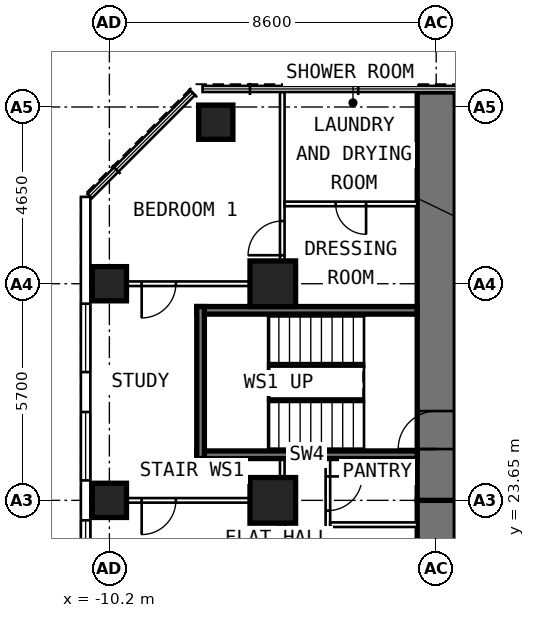
"""IFC4 building model, lengths in metres.
Left out: names, types, materials, properties, quantities, classifications, styles, units other than length and angle.
Written with IfcOpenShell. Run it as: python <this file> out.ifc"""

import sys

from ifc_helpers import new_model, si_unit, direction, frame, frame_2d, origin, origin_2d, place, context, subcontext, project, spatial, rectangle, extrude, element, fill, save


model = new_model("IFC4")
c1 = context("Model", 3, precision=1e-05, world=origin(), true_north=direction((0.0, 1.0)))
c2 = subcontext(c1, "Body", "Model", "MODEL_VIEW")
j1 = project(units=[si_unit("LENGTHUNIT", "METRE"), si_unit("PLANEANGLEUNIT", "RADIAN")], contexts=[c1])
p1 = place(None, origin())
s1 = spatial("IfcSite", under=j1, at=p1, CompositionType="ELEMENT")
p2 = place(p1, origin())
s2 = spatial("IfcBuilding", under=s1, at=p2, CompositionType="ELEMENT")
p3 = place(p2, frame((0.0, 0.0, 88.0)))
s3 = spatial("IfcBuildingStorey", under=s2, at=p3, CompositionType="ELEMENT", Elevation=88.0)
for number, where, z_axis, x_axis in (
    (1, (-10.2, 23.65, 0.0), (0.0, 0.0, 1.0), (0.0, 1.0, 0.0)),
    (2, (-10.2, 29.35, 0.0), (0.0, 0.0, 1.0), (0.0, 1.0, 0.0)),
    (3, (-7.4, 33.6, 0.0), (0.0, 0.0, 1.0), (0.0, 1.0, 0.0)),
):
    element("IfcColumn", number, at=place(p3, frame(where, z_axis=z_axis, x_axis=x_axis)), inside=s3, PredefinedType="COLUMN", context=c2, shape_type="SweptSolid", body=[
        extrude(rectangle(XDim=0.9, YDim=0.9, at=origin_2d()), origin(), (0.0, 0.0, 1.0), 3.6),
    ])
for number, where, z_axis, x_axis in (
    (4, (-5.9, 23.65, 0.0), (0.0, 0.0, 1.0), (0.0, 1.0, 0.0)),
    (5, (-5.9, 29.35, 0.0), (0.0, 0.0, 1.0), (0.0, 1.0, 0.0)),
):
    element("IfcColumn", number, at=place(p3, frame(where, z_axis=z_axis, x_axis=x_axis)), inside=s3, PredefinedType="COLUMN", context=c2, shape_type="SweptSolid", body=[
        extrude(rectangle(XDim=1.2, YDim=1.2, at=origin_2d()), origin(), (0.0, 0.0, 1.0), 3.6),
    ])
p4 = place(p3, frame((-1.6, 17.95, 0.0), z_axis=(0.0, 0.0, 1.0), x_axis=(0.0, 1.0, 0.0)))
e6 = element("IfcWall", 6, at=p4, inside=s3, PredefinedType="SHEAR", context=c2, shape_type="SweptSolid", body=[
    extrude(rectangle(XDim=5.7, YDim=1.0, at=frame_2d((2.85, 0.0))), origin(), (0.0, 0.0, 1.0), 3.6),
])
p5 = place(p4, frame((0.9, 0.0, 0.0)))
e7 = element("IfcOpeningElement", 7, at=p5, cuts=e6, PredefinedType="OPENING", context=c2, shape_type="SweptSolid", body=[
    extrude(rectangle(XDim=1.0, YDim=2.1, at=frame_2d((0.5, 1.05))), frame((0.0, 0.512, 0.0), z_axis=(0.0, -1.0, 0.0), x_axis=(1.0, 0.0, 0.0)), (0.0, 0.0, 1.0), 1.024),
])
p6 = place(p3, frame((-1.6, 23.65, 0.0), z_axis=(0.0, 0.0, 1.0), x_axis=(0.0, 1.0, 0.0)))
e8 = element("IfcWall", 8, at=p6, inside=s3, PredefinedType="SHEAR", context=c2, shape_type="SweptSolid", body=[
    extrude(rectangle(XDim=10.745, YDim=1.0, at=frame_2d((5.373, 0.0))), origin(), (0.0, 0.0, 1.0), 3.6),
])
p7 = place(p6, frame((1.35, 0.0, 0.0)))
e9 = element("IfcOpeningElement", 9, at=p7, cuts=e8, PredefinedType="OPENING", context=c2, shape_type="SweptSolid", body=[
    extrude(rectangle(XDim=1.0, YDim=2.1, at=frame_2d((0.5, 1.05))), frame((0.0, 0.512, 0.0), z_axis=(0.0, -1.0, 0.0), x_axis=(1.0, 0.0, 0.0)), (0.0, 0.0, 1.0), 1.024),
])
p8 = place(p3, frame((-10.825, 6.148, 0.0), z_axis=(0.0, 0.0, 1.0), x_axis=(0.0, 1.0, 0.0)))
e10 = element("IfcWall", 10, at=p8, inside=s3, PredefinedType="SOLIDWALL", context=c2, shape_type="SweptSolid", body=[
    extrude(rectangle(XDim=25.487, YDim=0.25, at=frame_2d((12.744, 0.0))), origin(), (0.0, 0.0, 1.0), 3.35),
])
p9 = place(p8, frame((0.927, 0.0, 0.8)))
e11 = element("IfcOpeningElement", 11, at=p9, cuts=e10, PredefinedType="OPENING", context=c2, shape_type="SweptSolid", body=[
    extrude(rectangle(XDim=1.8, YDim=1.8, at=frame_2d((0.9, 0.9))), frame((0.0, 0.137, 0.0), z_axis=(0.0, -1.0, 0.0), x_axis=(1.0, 0.0, 0.0)), (0.0, 0.0, 1.0), 0.274),
])
p10 = place(p8, frame((3.777, 0.0, 0.8)))
e12 = element("IfcOpeningElement", 12, at=p10, cuts=e10, PredefinedType="OPENING", context=c2, shape_type="SweptSolid", body=[
    extrude(rectangle(XDim=1.8, YDim=1.8, at=frame_2d((0.9, 0.9))), frame((0.0, 0.137, 0.0), z_axis=(0.0, -1.0, 0.0), x_axis=(1.0, 0.0, 0.0)), (0.0, 0.0, 1.0), 0.274),
])
p11 = place(p8, frame((6.627, 0.0, 0.8)))
e13 = element("IfcOpeningElement", 13, at=p11, cuts=e10, PredefinedType="OPENING", context=c2, shape_type="SweptSolid", body=[
    extrude(rectangle(XDim=1.8, YDim=1.8, at=frame_2d((0.9, 0.9))), frame((0.0, 0.137, 0.0), z_axis=(0.0, -1.0, 0.0), x_axis=(1.0, 0.0, 0.0)), (0.0, 0.0, 1.0), 0.274),
])
p12 = place(p8, frame((9.477, 0.0, 0.8)))
e14 = element("IfcOpeningElement", 14, at=p12, cuts=e10, PredefinedType="OPENING", context=c2, shape_type="SweptSolid", body=[
    extrude(rectangle(XDim=1.8, YDim=1.8, at=frame_2d((0.9, 0.9))), frame((0.0, 0.137, 0.0), z_axis=(0.0, -1.0, 0.0), x_axis=(1.0, 0.0, 0.0)), (0.0, 0.0, 1.0), 0.274),
])
p13 = place(p8, frame((12.327, 0.0, 0.8)))
e15 = element("IfcOpeningElement", 15, at=p13, cuts=e10, PredefinedType="OPENING", context=c2, shape_type="SweptSolid", body=[
    extrude(rectangle(XDim=1.8, YDim=1.8, at=frame_2d((0.9, 0.9))), frame((0.0, 0.137, 0.0), z_axis=(0.0, -1.0, 0.0), x_axis=(1.0, 0.0, 0.0)), (0.0, 0.0, 1.0), 0.274),
])
p14 = place(p8, frame((15.177, 0.0, 0.8)))
e16 = element("IfcOpeningElement", 16, at=p14, cuts=e10, PredefinedType="OPENING", context=c2, shape_type="SweptSolid", body=[
    extrude(rectangle(XDim=1.8, YDim=1.8, at=frame_2d((0.9, 0.9))), frame((0.0, 0.137, 0.0), z_axis=(0.0, -1.0, 0.0), x_axis=(1.0, 0.0, 0.0)), (0.0, 0.0, 1.0), 0.274),
])
p15 = place(p8, frame((18.027, 0.0, 0.8)))
e17 = element("IfcOpeningElement", 17, at=p15, cuts=e10, PredefinedType="OPENING", context=c2, shape_type="SweptSolid", body=[
    extrude(rectangle(XDim=1.8, YDim=1.8, at=frame_2d((0.9, 0.9))), frame((0.0, 0.137, 0.0), z_axis=(0.0, -1.0, 0.0), x_axis=(1.0, 0.0, 0.0)), (0.0, 0.0, 1.0), 0.274),
])
p16 = place(p8, frame((20.877, 0.0, 0.8)))
e18 = element("IfcOpeningElement", 18, at=p16, cuts=e10, PredefinedType="OPENING", context=c2, shape_type="SweptSolid", body=[
    extrude(rectangle(XDim=1.8, YDim=1.8, at=frame_2d((0.9, 0.9))), frame((0.0, 0.137, 0.0), z_axis=(0.0, -1.0, 0.0), x_axis=(1.0, 0.0, 0.0)), (0.0, 0.0, 1.0), 0.274),
])
p17 = place(p3, frame((-4.45, 18.05, 0.0), z_axis=(0.0, 0.0, 1.0), x_axis=(0.0, 1.0, 0.0)))
e19 = element("IfcWall", 19, at=p17, inside=s3, PredefinedType="PARTITIONING", context=c2, shape_type="SweptSolid", body=[
    extrude(rectangle(XDim=6.7, YDim=0.12, at=frame_2d((3.35, 0.0))), origin(), (0.0, 0.0, 1.0), 3.35),
])
p18 = place(p17, frame((0.75, 0.0, 0.0)))
e20 = element("IfcOpeningElement", 20, at=p18, cuts=e19, PredefinedType="OPENING", context=c2, shape_type="SweptSolid", body=[
    extrude(rectangle(XDim=0.9, YDim=2.1, at=frame_2d((0.45, 1.05))), frame((0.0, 0.072, 0.0), z_axis=(0.0, -1.0, 0.0), x_axis=(1.0, 0.0, 0.0)), (0.0, 0.0, 1.0), 0.144),
])
p19 = place(p17, frame((3.33, 0.0, 0.0)))
e21 = element("IfcOpeningElement", 21, at=p19, cuts=e19, PredefinedType="OPENING", context=c2, shape_type="SweptSolid", body=[
    extrude(rectangle(XDim=0.8, YDim=2.1, at=frame_2d((0.4, 1.05))), frame((0.0, 0.072, 0.0), z_axis=(0.0, -1.0, 0.0), x_axis=(1.0, 0.0, 0.0)), (0.0, 0.0, 1.0), 0.144),
])
p20 = place(p17, frame((5.33, 0.0, 0.0)))
e22 = element("IfcOpeningElement", 22, at=p20, cuts=e19, PredefinedType="OPENING", context=c2, shape_type="SweptSolid", body=[
    extrude(rectangle(XDim=0.9, YDim=2.1, at=frame_2d((0.45, 1.05))), frame((0.0, 0.072, 0.0), z_axis=(0.0, -1.0, 0.0), x_axis=(1.0, 0.0, 0.0)), (0.0, 0.0, 1.0), 0.144),
])
p21 = place(p3, frame((-5.65, 18.05, 0.0), z_axis=(0.0, 0.0, 1.0), x_axis=(0.0, 1.0, 0.0)))
e23 = element("IfcWall", 23, at=p21, inside=s3, PredefinedType="PARTITIONING", context=c2, shape_type="SweptSolid", body=[
    extrude(rectangle(XDim=6.7, YDim=0.12, at=frame_2d((3.35, 0.0))), origin(), (0.0, 0.0, 1.0), 3.35),
])
p22 = place(p21, frame((2.3, 0.0, 0.0)))
e24 = element("IfcOpeningElement", 24, at=p22, cuts=e23, PredefinedType="OPENING", context=c2, shape_type="SweptSolid", body=[
    extrude(rectangle(XDim=0.9, YDim=2.1, at=frame_2d((0.45, 1.05))), frame((0.0, 0.072, 0.0), z_axis=(0.0, -1.0, 0.0), x_axis=(1.0, 0.0, 0.0)), (0.0, 0.0, 1.0), 0.144),
])
p23 = place(p3, frame((-2.1, 23.01, 0.0), z_axis=(0.0, 0.0, 1.0), x_axis=(-1.0, 0.0, 0.0)))
e25 = element("IfcWall", 25, at=p23, inside=s3, PredefinedType="PARTITIONING", context=c2, shape_type="SweptSolid", body=[
    extrude(rectangle(XDim=2.29, YDim=0.12, at=frame_2d((1.145, 0.0))), origin(), (0.0, 0.0, 1.0), 3.35),
])
p24 = place(p3, frame((-5.71, 23.65, 0.0), z_axis=(0.0, 0.0, 1.0), x_axis=(-1.0, 0.0, 0.0)))
e26 = element("IfcWall", 26, at=p24, inside=s3, PredefinedType="PARTITIONING", context=c2, shape_type="SweptSolid", body=[
    extrude(rectangle(XDim=4.99, YDim=0.12, at=frame_2d((2.495, 0.0))), origin(), (0.0, 0.0, 1.0), 2.45),
])
p25 = place(p24, frame((2.74, 0.0, 0.0)))
e27 = element("IfcOpeningElement", 27, at=p25, cuts=e26, PredefinedType="OPENING", context=c2, shape_type="SweptSolid", body=[
    extrude(rectangle(XDim=0.9, YDim=2.1, at=frame_2d((0.45, 1.05))), frame((0.0, 0.072, 0.0), z_axis=(0.0, -1.0, 0.0), x_axis=(1.0, 0.0, 0.0)), (0.0, 0.0, 1.0), 0.144),
])
p26 = place(p3, frame((-5.71, 29.35, 0.0), z_axis=(0.0, 0.0, 1.0), x_axis=(-1.0, 0.0, 0.0)))
e28 = element("IfcWall", 28, at=p26, inside=s3, PredefinedType="PARTITIONING", context=c2, shape_type="SweptSolid", body=[
    extrude(rectangle(XDim=4.99, YDim=0.12, at=frame_2d((2.495, 0.0))), origin(), (0.0, 0.0, 1.0), 2.45),
])
p27 = place(p26, frame((2.74, 0.0, 0.0)))
e29 = element("IfcOpeningElement", 29, at=p27, cuts=e28, PredefinedType="OPENING", context=c2, shape_type="SweptSolid", body=[
    extrude(rectangle(XDim=0.9, YDim=2.1, at=frame_2d((0.45, 1.05))), frame((0.0, 0.072, 0.0), z_axis=(0.0, -1.0, 0.0), x_axis=(1.0, 0.0, 0.0)), (0.0, 0.0, 1.0), 0.144),
])
p28 = place(p3, frame((-5.65, 28.95, 0.0), z_axis=(0.0, 0.0, 1.0), x_axis=(0.0, 1.0, 0.0)))
e30 = element("IfcWall", 30, at=p28, inside=s3, PredefinedType="PARTITIONING", context=c2, shape_type="SweptSolid", body=[
    extrude(rectangle(XDim=5.445, YDim=0.12, at=frame_2d((2.723, 0.0))), origin(), (0.0, 0.0, 1.0), 3.35),
])
p29 = place(p28, frame((1.15, 0.0, 0.0)))
e31 = element("IfcOpeningElement", 31, at=p29, cuts=e30, PredefinedType="OPENING", context=c2, shape_type="SweptSolid", body=[
    extrude(rectangle(XDim=0.9, YDim=2.1, at=frame_2d((0.45, 1.05))), frame((0.0, 0.072, 0.0), z_axis=(0.0, -1.0, 0.0), x_axis=(1.0, 0.0, 0.0)), (0.0, 0.0, 1.0), 0.144),
])
p30 = place(p3, frame((-2.1, 31.45, 0.0), z_axis=(0.0, 0.0, 1.0), x_axis=(-1.0, 0.0, 0.0)))
e32 = element("IfcWall", 32, at=p30, inside=s3, PredefinedType="PARTITIONING", context=c2, shape_type="SweptSolid", body=[
    extrude(rectangle(XDim=3.49, YDim=0.12, at=frame_2d((1.745, 0.0))), origin(), (0.0, 0.0, 1.0), 3.35),
])
p31 = place(p30, frame((1.345, 0.0, 0.0)))
e33 = element("IfcOpeningElement", 33, at=p31, cuts=e32, PredefinedType="OPENING", context=c2, shape_type="SweptSolid", body=[
    extrude(rectangle(XDim=0.8, YDim=2.1, at=frame_2d((0.4, 1.05))), frame((0.0, 0.072, 0.0), z_axis=(0.0, -1.0, 0.0), x_axis=(1.0, 0.0, 0.0)), (0.0, 0.0, 1.0), 0.144),
])
for number, where, z_axis, x_axis in (
    (34, (-2.1, 24.85, 0.0), (0.0, 0.0, 1.0), (-1.0, 0.0, 0.0)),
    (35, (-2.1, 28.65, 0.0), (0.0, 0.0, 1.0), (-1.0, 0.0, 0.0)),
):
    element("IfcWall", number, at=place(p3, frame(where, z_axis=z_axis, x_axis=x_axis)), inside=s3, PredefinedType="SHEAR", context=c2, shape_type="SweptSolid", body=[
        extrude(rectangle(XDim=5.8, YDim=0.2, at=frame_2d((2.9, 0.0))), origin(), (0.0, 0.0, 1.0), 3.33),
    ])
p32 = place(p3, frame((-7.8, 24.75, 0.0), z_axis=(0.0, 0.0, 1.0), x_axis=(0.0, 1.0, 0.0)))
e36 = element("IfcWall", 36, at=p32, inside=s3, PredefinedType="SHEAR", context=c2, shape_type="SweptSolid", body=[
    extrude(rectangle(XDim=4.0, YDim=0.2, at=frame_2d((2.0, 0.0))), origin(), (0.0, 0.0, 1.0), 3.33),
])
p33 = place(p14, origin())
e37 = element("IfcWindow", 37, at=p33, inside=s3, PartitioningType="SINGLE_PANEL", PredefinedType="WINDOW", context=c2, shape_type="SweptSolid", body=[
    extrude(rectangle(XDim=1.8, YDim=1.8, at=frame_2d((0.9, 0.9))), frame((0.0, 0.03, 0.0), z_axis=(0.0, -1.0, 0.0), x_axis=(1.0, 0.0, 0.0)), (0.0, 0.0, 1.0), 0.06),
])
fill(e16, e37)
p34 = place(p15, origin())
e38 = element("IfcWindow", 38, at=p34, inside=s3, PartitioningType="SINGLE_PANEL", PredefinedType="WINDOW", context=c2, shape_type="SweptSolid", body=[
    extrude(rectangle(XDim=1.8, YDim=1.8, at=frame_2d((0.9, 0.9))), frame((0.0, 0.03, 0.0), z_axis=(0.0, -1.0, 0.0), x_axis=(1.0, 0.0, 0.0)), (0.0, 0.0, 1.0), 0.06),
])
fill(e17, e38)
p35 = place(p16, origin())
e39 = element("IfcWindow", 39, at=p35, inside=s3, PartitioningType="SINGLE_PANEL", PredefinedType="WINDOW", context=c2, shape_type="SweptSolid", body=[
    extrude(rectangle(XDim=1.8, YDim=1.8, at=frame_2d((0.9, 0.9))), frame((0.0, 0.03, 0.0), z_axis=(0.0, -1.0, 0.0), x_axis=(1.0, 0.0, 0.0)), (0.0, 0.0, 1.0), 0.06),
])
fill(e18, e39)
p36 = place(p20, frame((0.9, 0.0, 0.0), z_axis=(0.0, 0.0, 1.0), x_axis=(-1.0, 0.0, 0.0)))
e40 = element("IfcDoor", 40, at=p36, inside=s3, OperationType="SINGLE_SWING_LEFT", PredefinedType="DOOR", context=c2, shape_type="SweptSolid", body=[
    extrude(rectangle(XDim=0.9, YDim=2.1, at=frame_2d((0.45, 1.05))), frame((0.0, 0.025, 0.0), z_axis=(0.0, -1.0, 0.0), x_axis=(1.0, 0.0, 0.0)), (0.0, 0.0, 1.0), 0.05),
])
fill(e22, e40)
p37 = place(p27, origin())
e41 = element("IfcDoor", 41, at=p37, inside=s3, OperationType="SINGLE_SWING_RIGHT", PredefinedType="DOOR", context=c2, shape_type="SweptSolid", body=[
    extrude(rectangle(XDim=0.9, YDim=2.1, at=frame_2d((0.45, 1.05))), frame((0.0, 0.025, 0.0), z_axis=(0.0, -1.0, 0.0), x_axis=(1.0, 0.0, 0.0)), (0.0, 0.0, 1.0), 0.05),
])
fill(e29, e41)
p38 = place(p29, origin())
e42 = element("IfcDoor", 42, at=p38, inside=s3, OperationType="SINGLE_SWING_LEFT", PredefinedType="DOOR", context=c2, shape_type="SweptSolid", body=[
    extrude(rectangle(XDim=0.9, YDim=2.1, at=frame_2d((0.45, 1.05))), frame((0.0, 0.025, 0.0), z_axis=(0.0, -1.0, 0.0), x_axis=(1.0, 0.0, 0.0)), (0.0, 0.0, 1.0), 0.05),
])
fill(e31, e42)
p39 = place(p31, origin())
e43 = element("IfcDoor", 43, at=p39, inside=s3, OperationType="SINGLE_SWING_LEFT", PredefinedType="DOOR", context=c2, shape_type="SweptSolid", body=[
    extrude(rectangle(XDim=0.8, YDim=2.1, at=frame_2d((0.4, 1.05))), frame((0.0, 0.025, 0.0), z_axis=(0.0, -1.0, 0.0), x_axis=(1.0, 0.0, 0.0)), (0.0, 0.0, 1.0), 0.05),
])
fill(e33, e43)
p40 = place(p25, origin())
e44 = element("IfcDoor", 44, at=p40, inside=s3, OperationType="SINGLE_SWING_RIGHT", PredefinedType="DOOR", context=c2, shape_type="SweptSolid", body=[
    extrude(rectangle(XDim=0.9, YDim=2.1, at=frame_2d((0.45, 1.05))), frame((0.0, 0.025, 0.0), z_axis=(0.0, -1.0, 0.0), x_axis=(1.0, 0.0, 0.0)), (0.0, 0.0, 1.0), 0.05),
])
fill(e27, e44)
p41 = place(p7, origin())
e45 = element("IfcDoor", 45, at=p41, inside=s3, OperationType="SINGLE_SWING_LEFT", PredefinedType="DOOR", context=c2, shape_type="SweptSolid", body=[
    extrude(rectangle(XDim=1.0, YDim=2.1, at=frame_2d((0.5, 1.05))), frame((0.0, 0.25, 0.0), z_axis=(0.0, -1.0, 0.0), x_axis=(1.0, 0.0, 0.0)), (0.0, 0.0, 1.0), 0.5),
])
fill(e9, e45)
save(model, sys.argv[1])
